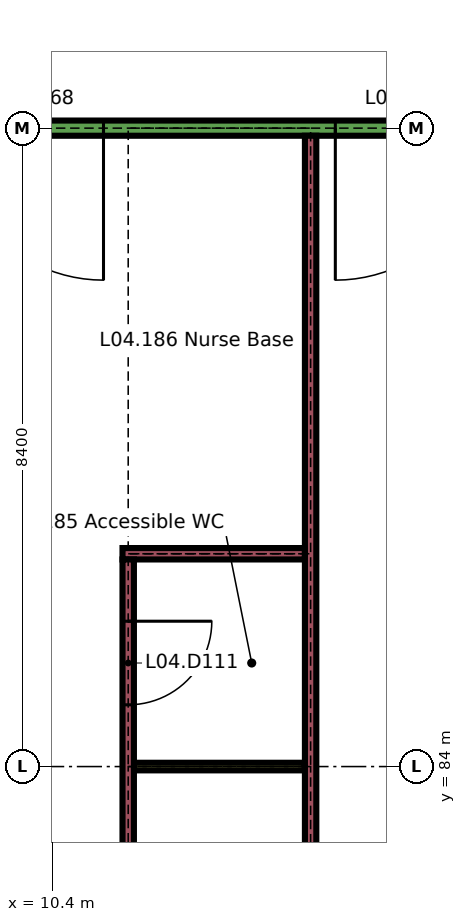
"""IFC4 building model, lengths in metres.
Left out: names, types, materials, properties, quantities, classifications, styles, units other than length and angle.
Written with IfcOpenShell. Run it as: python <this file> out.ifc"""

import sys

from ifc_helpers import new_model, si_unit, direction, frame, frame_2d, origin, place, context, subcontext, project, spatial, rectangle, extrude, element, fill, save


model = new_model("IFC4")
c1 = context("Model", 3, precision=1e-05, world=origin(), true_north=direction((0.0, 1.0)))
c2 = subcontext(c1, "Body", "Model", "MODEL_VIEW")
j1 = project(units=[si_unit("LENGTHUNIT", "METRE"), si_unit("PLANEANGLEUNIT", "RADIAN")], contexts=[c1])
p1 = place(None, origin())
s1 = spatial("IfcSite", under=j1, at=p1, CompositionType="ELEMENT")
p2 = place(p1, origin())
s2 = spatial("IfcBuilding", under=s1, at=p2, CompositionType="ELEMENT")
p3 = place(p2, frame((0.0, 0.0, 18.9)))
s3 = spatial("IfcBuildingStorey", under=s2, at=p3, CompositionType="ELEMENT", Elevation=18.9)
p4 = place(p3, frame((11.475, 84.0, 0.0), z_axis=(0.0, 0.0, 1.0), x_axis=(1.0, 0.0, 0.0)))
e1 = element("IfcWall", 1, at=p4, inside=s3, PredefinedType="PARTITIONING", context=c2, shape_type="SweptSolid", body=[
    extrude(rectangle(XDim=2.25, YDim=0.1, at=frame_2d((1.125, 0.0))), origin(), (0.0, 0.0, 1.0), 3.26),
])
p5 = place(p3, frame((11.325, 86.8, 0.0), z_axis=(0.0, 0.0, 1.0), x_axis=(1.0, 0.0, 0.0)))
e2 = element("IfcWall", 2, at=p5, inside=s3, PredefinedType="PARTITIONING", context=c2, shape_type="SweptSolid", body=[
    extrude(rectangle(XDim=2.4, YDim=0.15, at=frame_2d((1.2, 0.0))), origin(), (0.0, 0.0, 1.0), 3.26),
])
p6 = place(p3, frame((8.75, 92.4, 0.0), z_axis=(0.0, 0.0, 1.0), x_axis=(1.0, 0.0, 0.0)))
e3 = element("IfcWall", 3, at=p6, inside=s3, PredefinedType="PARTITIONING", context=c2, shape_type="SweptSolid", body=[
    extrude(rectangle(XDim=7.7, YDim=0.2, at=frame_2d((3.85, 0.0))), origin(), (0.0, 0.0, 1.0), 3.26),
])
p7 = place(p6, frame((0.325, 0.0, 0.0)))
e4 = element("IfcOpeningElement", 4, at=p7, cuts=e3, PredefinedType="OPENING", context=c2, shape_type="SweptSolid", body=[
    extrude(rectangle(XDim=2.0, YDim=2.4, at=frame_2d((1.0, 1.2))), frame((0.0, 0.11, 0.0), z_axis=(0.0, -1.0, 0.0), x_axis=(1.0, 0.0, 0.0)), (0.0, 0.0, 1.0), 0.22),
])
p8 = place(p6, frame((5.375, 0.0, 0.0)))
e5 = element("IfcOpeningElement", 5, at=p8, cuts=e3, PredefinedType="OPENING", context=c2, shape_type="SweptSolid", body=[
    extrude(rectangle(XDim=2.0, YDim=2.4, at=frame_2d((1.0, 1.2))), frame((0.0, 0.11, 0.0), z_axis=(0.0, -1.0, 0.0), x_axis=(1.0, 0.0, 0.0)), (0.0, 0.0, 1.0), 0.22),
])
p9 = place(p3, frame((11.4, 68.675, 0.0), z_axis=(0.0, 0.0, 1.0), x_axis=(0.0, 1.0, 0.0)))
e6 = element("IfcWall", 6, at=p9, inside=s3, PredefinedType="PARTITIONING", context=c2, shape_type="SweptSolid", body=[
    extrude(rectangle(XDim=18.05, YDim=0.15, at=frame_2d((9.025, 0.0))), origin(), (0.0, 0.0, 1.0), 3.26),
])
p10 = place(p9, frame((0.812, 0.0, 0.0)))
e7 = element("IfcOpeningElement", 7, at=p10, cuts=e6, PredefinedType="OPENING", context=c2, shape_type="SweptSolid", body=[
    extrude(rectangle(XDim=1.1, YDim=2.1, at=frame_2d((0.55, 1.05))), frame((0.0, 0.085, 0.0), z_axis=(0.0, -1.0, 0.0), x_axis=(1.0, 0.0, 0.0)), (0.0, 0.0, 1.0), 0.17),
])
p11 = place(p9, frame((8.475, 0.0, 0.0)))
e8 = element("IfcOpeningElement", 8, at=p11, cuts=e6, PredefinedType="OPENING", context=c2, shape_type="SweptSolid", body=[
    extrude(rectangle(XDim=1.1, YDim=2.1, at=frame_2d((0.55, 1.05))), frame((0.0, 0.085, 0.0), z_axis=(0.0, -1.0, 0.0), x_axis=(1.0, 0.0, 0.0)), (0.0, 0.0, 1.0), 0.17),
])
p12 = place(p9, frame((12.625, 0.0, 0.0)))
e9 = element("IfcOpeningElement", 9, at=p12, cuts=e6, PredefinedType="OPENING", context=c2, shape_type="SweptSolid", body=[
    extrude(rectangle(XDim=1.2, YDim=2.1, at=frame_2d((0.6, 1.05))), frame((0.0, 0.085, 0.0), z_axis=(0.0, -1.0, 0.0), x_axis=(1.0, 0.0, 0.0)), (0.0, 0.0, 1.0), 0.17),
])
p13 = place(p9, frame((16.137, 0.0, 0.0)))
e10 = element("IfcOpeningElement", 10, at=p13, cuts=e6, PredefinedType="OPENING", context=c2, shape_type="SweptSolid", body=[
    extrude(rectangle(XDim=1.1, YDim=2.1, at=frame_2d((0.55, 1.05))), frame((0.0, 0.085, 0.0), z_axis=(0.0, -1.0, 0.0), x_axis=(1.0, 0.0, 0.0)), (0.0, 0.0, 1.0), 0.17),
])
p14 = place(p3, frame((13.8, 33.7, 0.0), z_axis=(0.0, 0.0, 1.0), x_axis=(0.0, 1.0, 0.0)))
e11 = element("IfcWall", 11, at=p14, inside=s3, PredefinedType="PARTITIONING", context=c2, shape_type="SweptSolid", body=[
    extrude(rectangle(XDim=58.6, YDim=0.15, at=frame_2d((29.3, 0.0))), origin(), (0.0, 0.0, 1.0), 3.26),
])
p15 = place(p14, frame((12.6, 0.0, 0.0)))
e12 = element("IfcOpeningElement", 12, at=p15, cuts=e11, PredefinedType="OPENING", context=c2, shape_type="SweptSolid", body=[
    extrude(rectangle(XDim=1.2, YDim=2.1, at=frame_2d((0.6, 1.05))), frame((0.0, 0.085, 0.0), z_axis=(0.0, -1.0, 0.0), x_axis=(1.0, 0.0, 0.0)), (0.0, 0.0, 1.0), 0.17),
])
p16 = place(p14, frame((39.2, 0.0, 0.0)))
e13 = element("IfcOpeningElement", 13, at=p16, cuts=e11, PredefinedType="OPENING", context=c2, shape_type="SweptSolid", body=[
    extrude(rectangle(XDim=1.2, YDim=2.1, at=frame_2d((0.6, 1.05))), frame((0.0, 0.085, 0.0), z_axis=(0.0, -1.0, 0.0), x_axis=(1.0, 0.0, 0.0)), (0.0, 0.0, 1.0), 0.17),
])
p17 = place(p7, origin())
e14 = element("IfcDoor", 14, at=p17, inside=s3, OperationType="SINGLE_SWING_RIGHT", PredefinedType="DOOR", context=c2, shape_type="SweptSolid", body=[
    extrude(rectangle(XDim=2.0, YDim=2.4, at=frame_2d((1.0, 1.2))), frame((0.0, 0.03, 0.0), z_axis=(0.0, -1.0, 0.0), x_axis=(1.0, 0.0, 0.0)), (0.0, 0.0, 1.0), 0.06),
])
fill(e4, e14)
p18 = place(p8, origin())
e15 = element("IfcDoor", 15, at=p18, inside=s3, OperationType="SINGLE_SWING_LEFT", PredefinedType="DOOR", context=c2, shape_type="SweptSolid", body=[
    extrude(rectangle(XDim=2.0, YDim=2.4, at=frame_2d((1.0, 1.2))), frame((0.0, 0.03, 0.0), z_axis=(0.0, -1.0, 0.0), x_axis=(1.0, 0.0, 0.0)), (0.0, 0.0, 1.0), 0.06),
])
fill(e5, e15)
p19 = place(p13, origin())
e16 = element("IfcDoor", 16, at=p19, inside=s3, OperationType="SINGLE_SWING_RIGHT", PredefinedType="DOOR", context=c2, shape_type="SweptSolid", body=[
    extrude(rectangle(XDim=1.1, YDim=2.1, at=frame_2d((0.55, 1.05))), frame((0.0, 0.025, 0.0), z_axis=(0.0, -1.0, 0.0), x_axis=(1.0, 0.0, 0.0)), (0.0, 0.0, 1.0), 0.05),
])
fill(e10, e16)
save(model, sys.argv[1])
